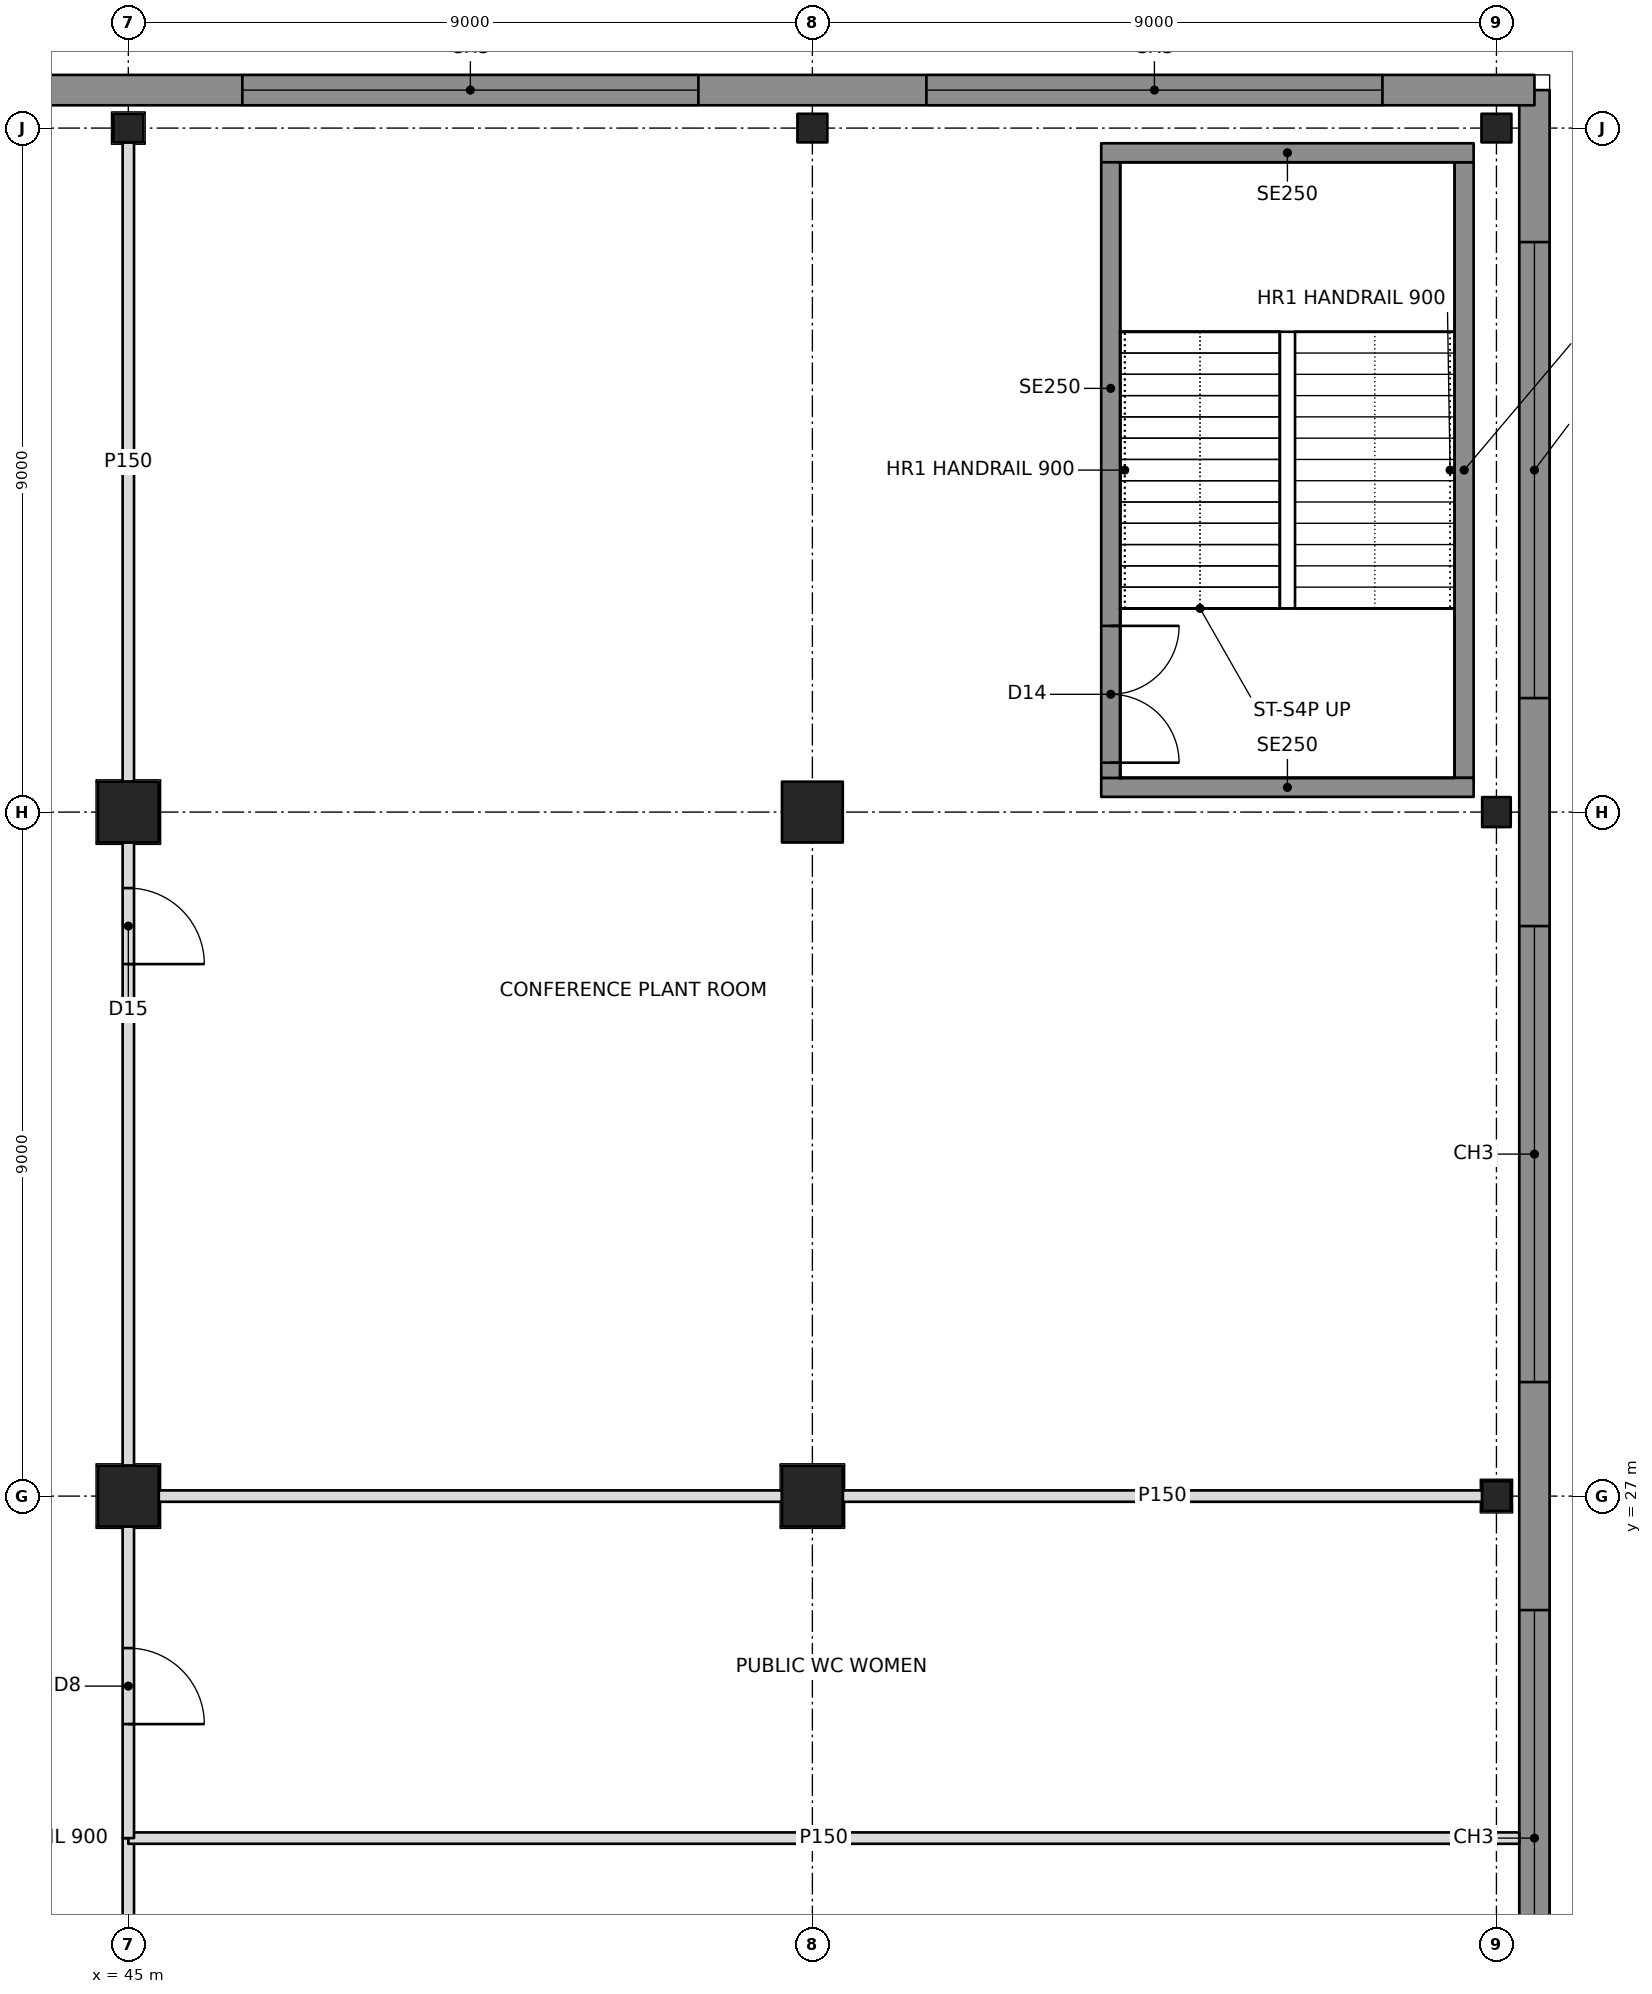
"""IFC4 building model, lengths in metres.
Left out: names, types, materials, properties, quantities, classifications, styles, units other than length and angle.
Written with IfcOpenShell. Run it as: python <this file> out.ifc"""

import sys

from ifc_helpers import new_model, si_unit, direction, frame, frame_2d, origin, origin_2d, place, context, subcontext, project, spatial, rectangle, hollow_rectangle, i_section, extrude, element, fill, save


model = new_model("IFC4")
c1 = context("Model", 3, precision=1e-05, world=origin(), true_north=direction((0.0, 1.0)))
c2 = subcontext(c1, "Body", "Model", "MODEL_VIEW")
j1 = project(units=[si_unit("LENGTHUNIT", "METRE"), si_unit("PLANEANGLEUNIT", "RADIAN")], contexts=[c1])
p1 = place(None, origin())
s1 = spatial("IfcSite", under=j1, at=p1, CompositionType="ELEMENT")
p2 = place(p1, origin())
s2 = spatial("IfcBuilding", under=s1, at=p2, CompositionType="ELEMENT")
p3 = place(p2, frame((0.0, 0.0, 11.0)))
s3 = spatial("IfcBuildingStorey", under=s2, at=p3, CompositionType="ELEMENT", Elevation=11.0)
for number, where, z_axis, x_axis in (
    (1, (45.0, 27.0, 0.0), (0.0, 0.0, 1.0), (0.0, 1.0, 0.0)),
    (2, (45.0, 36.0, 0.0), (0.0, 0.0, 1.0), (1.0, 0.0, 0.0)),
):
    element("IfcColumn", number, at=place(p3, frame(where, z_axis=z_axis, x_axis=x_axis)), inside=s3, PredefinedType="COLUMN", context=c2, shape_type="SweptSolid", body=[
        extrude(hollow_rectangle(XDim=0.8, YDim=0.8, WallThickness=0.1, at=origin_2d()), origin(), (0.0, 0.0, 1.0), 5.0),
    ])
p4 = place(p3, frame((45.0, 45.0, 0.0), z_axis=(0.0, 0.0, 1.0), x_axis=(1.0, 0.0, 0.0)))
e3 = element("IfcColumn", 3, at=p4, inside=s3, PredefinedType="COLUMN", context=c2, shape_type="SweptSolid", body=[
    extrude(i_section(OverallWidth=0.394, OverallDepth=0.376, WebThickness=0.017, FlangeThickness=0.028, at=origin_2d()), origin(), (0.0, 0.0, 1.0), 5.0),
])
for number, where, z_axis, x_axis in (
    (4, (54.0, 27.0, 0.0), (0.0, 0.0, 1.0), (0.0, 1.0, 0.0)),
    (5, (54.0, 36.0, 0.0), (0.0, 0.0, 1.0), (1.0, 0.0, 0.0)),
):
    element("IfcColumn", number, at=place(p3, frame(where, z_axis=z_axis, x_axis=x_axis)), inside=s3, PredefinedType="COLUMN", context=c2, shape_type="SweptSolid", body=[
        extrude(hollow_rectangle(XDim=0.8, YDim=0.8, WallThickness=0.1, at=origin_2d()), origin(), (0.0, 0.0, 1.0), 5.0),
    ])
for number, where, z_axis, x_axis in (
    (6, (54.0, 45.0, 0.0), (0.0, 0.0, 1.0), (1.0, 0.0, 0.0)),
    (7, (63.0, 27.0, 0.0), (0.0, 0.0, 1.0), (0.0, 1.0, 0.0)),
    (8, (63.0, 36.0, 0.0), (0.0, 0.0, 1.0), (0.0, 1.0, 0.0)),
    (9, (63.0, 45.0, 0.0), (0.0, 0.0, 1.0), (1.0, 0.0, 0.0)),
):
    element("IfcColumn", number, at=place(p3, frame(where, z_axis=z_axis, x_axis=x_axis)), inside=s3, PredefinedType="COLUMN", context=c2, shape_type="SweptSolid", body=[
        extrude(i_section(OverallWidth=0.394, OverallDepth=0.376, WebThickness=0.017, FlangeThickness=0.028, at=origin_2d()), origin(), (0.0, 0.0, 1.0), 5.0),
    ])
p5 = place(p3, frame((63.5, -27.5, 0.0), z_axis=(0.0, 0.0, 1.0), x_axis=(0.0, 1.0, 0.0)))
e10 = element("IfcWall", 10, at=p5, inside=s3, PredefinedType="SOLIDWALL", context=c2, shape_type="SweptSolid", body=[
    extrude(rectangle(XDim=73.0, YDim=0.4, at=frame_2d((36.5, 0.0))), origin(), (0.0, 0.0, 1.0), 4.75),
])
p6 = place(p5, frame((2.0, 0.0, 0.9)))
e11 = element("IfcOpeningElement", 11, at=p6, cuts=e10, PredefinedType="OPENING", context=c2, shape_type="SweptSolid", body=[
    extrude(rectangle(XDim=6.0, YDim=2.6, at=frame_2d((3.0, 1.3))), frame((0.0, 0.21, 0.0), z_axis=(0.0, -1.0, 0.0), x_axis=(1.0, 0.0, 0.0)), (0.0, 0.0, 1.0), 0.42),
])
p7 = place(p5, frame((11.0, 0.0, 0.9)))
e12 = element("IfcOpeningElement", 12, at=p7, cuts=e10, PredefinedType="OPENING", context=c2, shape_type="SweptSolid", body=[
    extrude(rectangle(XDim=6.0, YDim=2.6, at=frame_2d((3.0, 1.3))), frame((0.0, 0.21, 0.0), z_axis=(0.0, -1.0, 0.0), x_axis=(1.0, 0.0, 0.0)), (0.0, 0.0, 1.0), 0.42),
])
p8 = place(p5, frame((20.0, 0.0, 0.9)))
e13 = element("IfcOpeningElement", 13, at=p8, cuts=e10, PredefinedType="OPENING", context=c2, shape_type="SweptSolid", body=[
    extrude(rectangle(XDim=6.0, YDim=2.6, at=frame_2d((3.0, 1.3))), frame((0.0, 0.21, 0.0), z_axis=(0.0, -1.0, 0.0), x_axis=(1.0, 0.0, 0.0)), (0.0, 0.0, 1.0), 0.42),
])
p9 = place(p5, frame((29.0, 0.0, 0.9)))
e14 = element("IfcOpeningElement", 14, at=p9, cuts=e10, PredefinedType="OPENING", context=c2, shape_type="SweptSolid", body=[
    extrude(rectangle(XDim=6.0, YDim=2.6, at=frame_2d((3.0, 1.3))), frame((0.0, 0.21, 0.0), z_axis=(0.0, -1.0, 0.0), x_axis=(1.0, 0.0, 0.0)), (0.0, 0.0, 1.0), 0.42),
])
p10 = place(p5, frame((38.0, 0.0, 0.9)))
e15 = element("IfcOpeningElement", 15, at=p10, cuts=e10, PredefinedType="OPENING", context=c2, shape_type="SweptSolid", body=[
    extrude(rectangle(XDim=6.0, YDim=2.6, at=frame_2d((3.0, 1.3))), frame((0.0, 0.21, 0.0), z_axis=(0.0, -1.0, 0.0), x_axis=(1.0, 0.0, 0.0)), (0.0, 0.0, 1.0), 0.42),
])
p11 = place(p5, frame((47.0, 0.0, 0.9)))
e16 = element("IfcOpeningElement", 16, at=p11, cuts=e10, PredefinedType="OPENING", context=c2, shape_type="SweptSolid", body=[
    extrude(rectangle(XDim=6.0, YDim=2.6, at=frame_2d((3.0, 1.3))), frame((0.0, 0.21, 0.0), z_axis=(0.0, -1.0, 0.0), x_axis=(1.0, 0.0, 0.0)), (0.0, 0.0, 1.0), 0.42),
])
p12 = place(p5, frame((56.0, 0.0, 0.9)))
e17 = element("IfcOpeningElement", 17, at=p12, cuts=e10, PredefinedType="OPENING", context=c2, shape_type="SweptSolid", body=[
    extrude(rectangle(XDim=6.0, YDim=2.6, at=frame_2d((3.0, 1.3))), frame((0.0, 0.21, 0.0), z_axis=(0.0, -1.0, 0.0), x_axis=(1.0, 0.0, 0.0)), (0.0, 0.0, 1.0), 0.42),
])
p13 = place(p5, frame((65.0, 0.0, 0.9)))
e18 = element("IfcOpeningElement", 18, at=p13, cuts=e10, PredefinedType="OPENING", context=c2, shape_type="SweptSolid", body=[
    extrude(rectangle(XDim=6.0, YDim=2.6, at=frame_2d((3.0, 1.3))), frame((0.0, 0.21, 0.0), z_axis=(0.0, -1.0, 0.0), x_axis=(1.0, 0.0, 0.0)), (0.0, 0.0, 1.0), 0.42),
])
p14 = place(p3, frame((63.5, 45.5, 0.0), z_axis=(0.0, 0.0, 1.0), x_axis=(-1.0, 0.0, 0.0)))
e19 = element("IfcWall", 19, at=p14, inside=s3, PredefinedType="SOLIDWALL", context=c2, shape_type="SweptSolid", body=[
    extrude(rectangle(XDim=73.0, YDim=0.4, at=frame_2d((36.5, 0.0))), origin(), (0.0, 0.0, 1.0), 4.75),
])
p15 = place(p14, frame((2.0, 0.0, 0.9)))
e20 = element("IfcOpeningElement", 20, at=p15, cuts=e19, PredefinedType="OPENING", context=c2, shape_type="SweptSolid", body=[
    extrude(rectangle(XDim=6.0, YDim=2.6, at=frame_2d((3.0, 1.3))), frame((0.0, 0.21, 0.0), z_axis=(0.0, -1.0, 0.0), x_axis=(1.0, 0.0, 0.0)), (0.0, 0.0, 1.0), 0.42),
])
p16 = place(p14, frame((11.0, 0.0, 0.9)))
e21 = element("IfcOpeningElement", 21, at=p16, cuts=e19, PredefinedType="OPENING", context=c2, shape_type="SweptSolid", body=[
    extrude(rectangle(XDim=6.0, YDim=2.6, at=frame_2d((3.0, 1.3))), frame((0.0, 0.21, 0.0), z_axis=(0.0, -1.0, 0.0), x_axis=(1.0, 0.0, 0.0)), (0.0, 0.0, 1.0), 0.42),
])
p17 = place(p14, frame((20.0, 0.0, 0.9)))
e22 = element("IfcOpeningElement", 22, at=p17, cuts=e19, PredefinedType="OPENING", context=c2, shape_type="SweptSolid", body=[
    extrude(rectangle(XDim=6.0, YDim=2.6, at=frame_2d((3.0, 1.3))), frame((0.0, 0.21, 0.0), z_axis=(0.0, -1.0, 0.0), x_axis=(1.0, 0.0, 0.0)), (0.0, 0.0, 1.0), 0.42),
])
p18 = place(p14, frame((29.0, 0.0, 0.9)))
e23 = element("IfcOpeningElement", 23, at=p18, cuts=e19, PredefinedType="OPENING", context=c2, shape_type="SweptSolid", body=[
    extrude(rectangle(XDim=6.0, YDim=2.6, at=frame_2d((3.0, 1.3))), frame((0.0, 0.21, 0.0), z_axis=(0.0, -1.0, 0.0), x_axis=(1.0, 0.0, 0.0)), (0.0, 0.0, 1.0), 0.42),
])
p19 = place(p14, frame((38.0, 0.0, 0.9)))
e24 = element("IfcOpeningElement", 24, at=p19, cuts=e19, PredefinedType="OPENING", context=c2, shape_type="SweptSolid", body=[
    extrude(rectangle(XDim=6.0, YDim=2.6, at=frame_2d((3.0, 1.3))), frame((0.0, 0.21, 0.0), z_axis=(0.0, -1.0, 0.0), x_axis=(1.0, 0.0, 0.0)), (0.0, 0.0, 1.0), 0.42),
])
p20 = place(p14, frame((47.0, 0.0, 0.9)))
e25 = element("IfcOpeningElement", 25, at=p20, cuts=e19, PredefinedType="OPENING", context=c2, shape_type="SweptSolid", body=[
    extrude(rectangle(XDim=6.0, YDim=2.6, at=frame_2d((3.0, 1.3))), frame((0.0, 0.21, 0.0), z_axis=(0.0, -1.0, 0.0), x_axis=(1.0, 0.0, 0.0)), (0.0, 0.0, 1.0), 0.42),
])
p21 = place(p14, frame((56.0, 0.0, 0.9)))
e26 = element("IfcOpeningElement", 26, at=p21, cuts=e19, PredefinedType="OPENING", context=c2, shape_type="SweptSolid", body=[
    extrude(rectangle(XDim=6.0, YDim=2.6, at=frame_2d((3.0, 1.3))), frame((0.0, 0.21, 0.0), z_axis=(0.0, -1.0, 0.0), x_axis=(1.0, 0.0, 0.0)), (0.0, 0.0, 1.0), 0.42),
])
p22 = place(p14, frame((65.0, 0.0, 0.9)))
e27 = element("IfcOpeningElement", 27, at=p22, cuts=e19, PredefinedType="OPENING", context=c2, shape_type="SweptSolid", body=[
    extrude(rectangle(XDim=6.0, YDim=2.6, at=frame_2d((3.0, 1.3))), frame((0.0, 0.21, 0.0), z_axis=(0.0, -1.0, 0.0), x_axis=(1.0, 0.0, 0.0)), (0.0, 0.0, 1.0), 0.42),
])
p23 = place(p3, frame((45.0, 18.4, 0.0), z_axis=(0.0, 0.0, 1.0), x_axis=(0.0, 1.0, 0.0)))
e28 = element("IfcWall", 28, at=p23, inside=s3, PredefinedType="PARTITIONING", context=c2, shape_type="SweptSolid", body=[
    extrude(rectangle(XDim=4.1, YDim=0.15, at=frame_2d((2.05, 0.0))), origin(), (0.0, 0.0, 1.0), 3.892),
])
p24 = place(p23, frame((1.1, 0.0, 0.0)))
e29 = element("IfcOpeningElement", 29, at=p24, cuts=e28, PredefinedType="OPENING", context=c2, shape_type="SweptSolid", body=[
    extrude(rectangle(XDim=1.0, YDim=2.1, at=frame_2d((0.5, 1.05))), frame((0.0, 0.085, 0.0), z_axis=(0.0, -1.0, 0.0), x_axis=(1.0, 0.0, 0.0)), (0.0, 0.0, 1.0), 0.17),
])
p25 = place(p3, frame((45.0, 22.5, 0.0), z_axis=(0.0, 0.0, 1.0), x_axis=(1.0, 0.0, 0.0)))
e30 = element("IfcWall", 30, at=p25, inside=s3, PredefinedType="PARTITIONING", context=c2, shape_type="SweptSolid", body=[
    extrude(rectangle(XDim=18.3, YDim=0.15, at=frame_2d((9.15, 0.0))), origin(), (0.0, 0.0, 1.0), 3.891),
])
p26 = place(p3, frame((45.0, 22.5, 0.0), z_axis=(0.0, 0.0, 1.0), x_axis=(0.0, 1.0, 0.0)))
e31 = element("IfcWall", 31, at=p26, inside=s3, PredefinedType="PARTITIONING", context=c2, shape_type="SweptSolid", body=[
    extrude(rectangle(XDim=4.1, YDim=0.15, at=frame_2d((2.05, 0.0))), origin(), (0.0, 0.0, 1.0), 3.892),
])
p27 = place(p26, frame((1.5, 0.0, 0.0)))
e32 = element("IfcOpeningElement", 32, at=p27, cuts=e31, PredefinedType="OPENING", context=c2, shape_type="SweptSolid", body=[
    extrude(rectangle(XDim=1.0, YDim=2.1, at=frame_2d((0.5, 1.05))), frame((0.0, 0.085, 0.0), z_axis=(0.0, -1.0, 0.0), x_axis=(1.0, 0.0, 0.0)), (0.0, 0.0, 1.0), 0.17),
])
p28 = place(p3, frame((45.4, 27.0, 0.0), z_axis=(0.0, 0.0, 1.0), x_axis=(1.0, 0.0, 0.0)))
e33 = element("IfcWall", 33, at=p28, inside=s3, PredefinedType="PARTITIONING", context=c2, shape_type="SweptSolid", body=[
    extrude(rectangle(XDim=8.2, YDim=0.15, at=frame_2d((4.1, 0.0))), origin(), (0.0, 0.0, 1.0), 3.892),
])
p29 = place(p3, frame((54.4, 27.0, 0.0), z_axis=(0.0, 0.0, 1.0), x_axis=(1.0, 0.0, 0.0)))
e34 = element("IfcWall", 34, at=p29, inside=s3, PredefinedType="PARTITIONING", context=c2, shape_type="SweptSolid", body=[
    extrude(rectangle(XDim=8.412, YDim=0.15, at=frame_2d((4.206, 0.0))), origin(), (0.0, 0.0, 1.0), 3.892),
])
p30 = place(p3, frame((45.0, 27.4, 0.0), z_axis=(0.0, 0.0, 1.0), x_axis=(0.0, 1.0, 0.0)))
e35 = element("IfcWall", 35, at=p30, inside=s3, PredefinedType="PARTITIONING", context=c2, shape_type="SweptSolid", body=[
    extrude(rectangle(XDim=8.2, YDim=0.15, at=frame_2d((4.1, 0.0))), origin(), (0.0, 0.0, 1.0), 3.892),
])
p31 = place(p30, frame((6.6, 0.0, 0.0)))
e36 = element("IfcOpeningElement", 36, at=p31, cuts=e35, PredefinedType="OPENING", context=c2, shape_type="SweptSolid", body=[
    extrude(rectangle(XDim=1.0, YDim=2.1, at=frame_2d((0.5, 1.05))), frame((0.0, 0.085, 0.0), z_axis=(0.0, -1.0, 0.0), x_axis=(1.0, 0.0, 0.0)), (0.0, 0.0, 1.0), 0.17),
])
p32 = place(p3, frame((45.0, 36.4, 0.0), z_axis=(0.0, 0.0, 1.0), x_axis=(0.0, 1.0, 0.0)))
e37 = element("IfcWall", 37, at=p32, inside=s3, PredefinedType="PARTITIONING", context=c2, shape_type="SweptSolid", body=[
    extrude(rectangle(XDim=8.412, YDim=0.15, at=frame_2d((4.206, 0.0))), origin(), (0.0, 0.0, 1.0), 3.892),
])
for number, where, z_axis, x_axis in (
    (38, (57.8, 36.325, 0.0), (0.0, 0.0, 1.0), (1.0, 0.0, 0.0)),
    (39, (57.8, 44.675, 0.0), (0.0, 0.0, 1.0), (1.0, 0.0, 0.0)),
):
    element("IfcWall", number, at=place(p3, frame(where, z_axis=z_axis, x_axis=x_axis)), inside=s3, PredefinedType="SOLIDWALL", context=c2, shape_type="SweptSolid", body=[
        extrude(rectangle(XDim=4.9, YDim=0.25, at=frame_2d((2.45, 0.0))), origin(), (0.0, 0.0, 1.0), 4.75),
    ])
p33 = place(p3, frame((57.925, 36.45, 0.0), z_axis=(0.0, 0.0, 1.0), x_axis=(0.0, 1.0, 0.0)))
e40 = element("IfcWall", 40, at=p33, inside=s3, PredefinedType="SOLIDWALL", context=c2, shape_type="SweptSolid", body=[
    extrude(rectangle(XDim=8.1, YDim=0.25, at=frame_2d((4.05, 0.0))), origin(), (0.0, 0.0, 1.0), 4.75),
])
p34 = place(p33, frame((0.2, 0.0, 0.0)))
e41 = element("IfcOpeningElement", 41, at=p34, cuts=e40, PredefinedType="OPENING", context=c2, shape_type="SweptSolid", body=[
    extrude(rectangle(XDim=1.8, YDim=2.1, at=frame_2d((0.9, 1.05))), frame((0.0, 0.135, 0.0), z_axis=(0.0, -1.0, 0.0), x_axis=(1.0, 0.0, 0.0)), (0.0, 0.0, 1.0), 0.27),
])
p35 = place(p3, frame((62.575, 36.45, 0.0), z_axis=(0.0, 0.0, 1.0), x_axis=(0.0, 1.0, 0.0)))
e42 = element("IfcWall", 42, at=p35, inside=s3, PredefinedType="SOLIDWALL", context=c2, shape_type="SweptSolid", body=[
    extrude(rectangle(XDim=8.1, YDim=0.25, at=frame_2d((4.05, 0.0))), origin(), (0.0, 0.0, 1.0), 4.75),
])
p36 = place(p11, origin())
e43 = element("IfcWindow", 43, at=p36, inside=s3, PartitioningType="TRIPLE_PANEL_VERTICAL", PredefinedType="WINDOW", context=c2, shape_type="SweptSolid", body=[
    extrude(rectangle(XDim=6.0, YDim=2.6, at=frame_2d((3.0, 1.3))), frame((0.0, 0.03, 0.0), z_axis=(0.0, -1.0, 0.0), x_axis=(1.0, 0.0, 0.0)), (0.0, 0.0, 1.0), 0.06),
])
fill(e16, e43)
p37 = place(p12, origin())
e44 = element("IfcWindow", 44, at=p37, inside=s3, PartitioningType="TRIPLE_PANEL_VERTICAL", PredefinedType="WINDOW", context=c2, shape_type="SweptSolid", body=[
    extrude(rectangle(XDim=6.0, YDim=2.6, at=frame_2d((3.0, 1.3))), frame((0.0, 0.03, 0.0), z_axis=(0.0, -1.0, 0.0), x_axis=(1.0, 0.0, 0.0)), (0.0, 0.0, 1.0), 0.06),
])
fill(e17, e44)
p38 = place(p13, origin())
e45 = element("IfcWindow", 45, at=p38, inside=s3, PartitioningType="TRIPLE_PANEL_VERTICAL", PredefinedType="WINDOW", context=c2, shape_type="SweptSolid", body=[
    extrude(rectangle(XDim=6.0, YDim=2.6, at=frame_2d((3.0, 1.3))), frame((0.0, 0.03, 0.0), z_axis=(0.0, -1.0, 0.0), x_axis=(1.0, 0.0, 0.0)), (0.0, 0.0, 1.0), 0.06),
])
fill(e18, e45)
p39 = place(p15, origin())
e46 = element("IfcWindow", 46, at=p39, inside=s3, PartitioningType="TRIPLE_PANEL_VERTICAL", PredefinedType="WINDOW", context=c2, shape_type="SweptSolid", body=[
    extrude(rectangle(XDim=6.0, YDim=2.6, at=frame_2d((3.0, 1.3))), frame((0.0, 0.03, 0.0), z_axis=(0.0, -1.0, 0.0), x_axis=(1.0, 0.0, 0.0)), (0.0, 0.0, 1.0), 0.06),
])
fill(e20, e46)
p40 = place(p16, origin())
e47 = element("IfcWindow", 47, at=p40, inside=s3, PartitioningType="TRIPLE_PANEL_VERTICAL", PredefinedType="WINDOW", context=c2, shape_type="SweptSolid", body=[
    extrude(rectangle(XDim=6.0, YDim=2.6, at=frame_2d((3.0, 1.3))), frame((0.0, 0.03, 0.0), z_axis=(0.0, -1.0, 0.0), x_axis=(1.0, 0.0, 0.0)), (0.0, 0.0, 1.0), 0.06),
])
fill(e21, e47)
p41 = place(p27, frame((1.0, 0.0, 0.0), z_axis=(0.0, 0.0, 1.0), x_axis=(-1.0, 0.0, 0.0)))
e48 = element("IfcDoor", 48, at=p41, inside=s3, OperationType="SINGLE_SWING_RIGHT", PredefinedType="DOOR", context=c2, shape_type="SweptSolid", body=[
    extrude(rectangle(XDim=1.0, YDim=2.1, at=frame_2d((0.5, 1.05))), frame((0.0, 0.025, 0.0), z_axis=(0.0, -1.0, 0.0), x_axis=(1.0, 0.0, 0.0)), (0.0, 0.0, 1.0), 0.05),
])
fill(e32, e48)
p42 = place(p31, frame((1.0, 0.0, 0.0), z_axis=(0.0, 0.0, 1.0), x_axis=(-1.0, 0.0, 0.0)))
e49 = element("IfcDoor", 49, at=p42, inside=s3, OperationType="SINGLE_SWING_RIGHT", PredefinedType="DOOR", context=c2, shape_type="SweptSolid", body=[
    extrude(rectangle(XDim=1.0, YDim=2.1, at=frame_2d((0.5, 1.05))), frame((0.0, 0.025, 0.0), z_axis=(0.0, -1.0, 0.0), x_axis=(1.0, 0.0, 0.0)), (0.0, 0.0, 1.0), 0.05),
])
fill(e36, e49)
p43 = place(p34, frame((1.8, 0.0, 0.0), z_axis=(0.0, 0.0, 1.0), x_axis=(-1.0, 0.0, 0.0)))
e50 = element("IfcDoor", 50, at=p43, inside=s3, OperationType="DOUBLE_DOOR_SINGLE_SWING", PredefinedType="DOOR", context=c2, shape_type="SweptSolid", body=[
    extrude(rectangle(XDim=1.8, YDim=2.1, at=frame_2d((0.9, 1.05))), frame((0.0, 0.025, 0.0), z_axis=(0.0, -1.0, 0.0), x_axis=(1.0, 0.0, 0.0)), (0.0, 0.0, 1.0), 0.05),
])
fill(e41, e50)
save(model, sys.argv[1])
